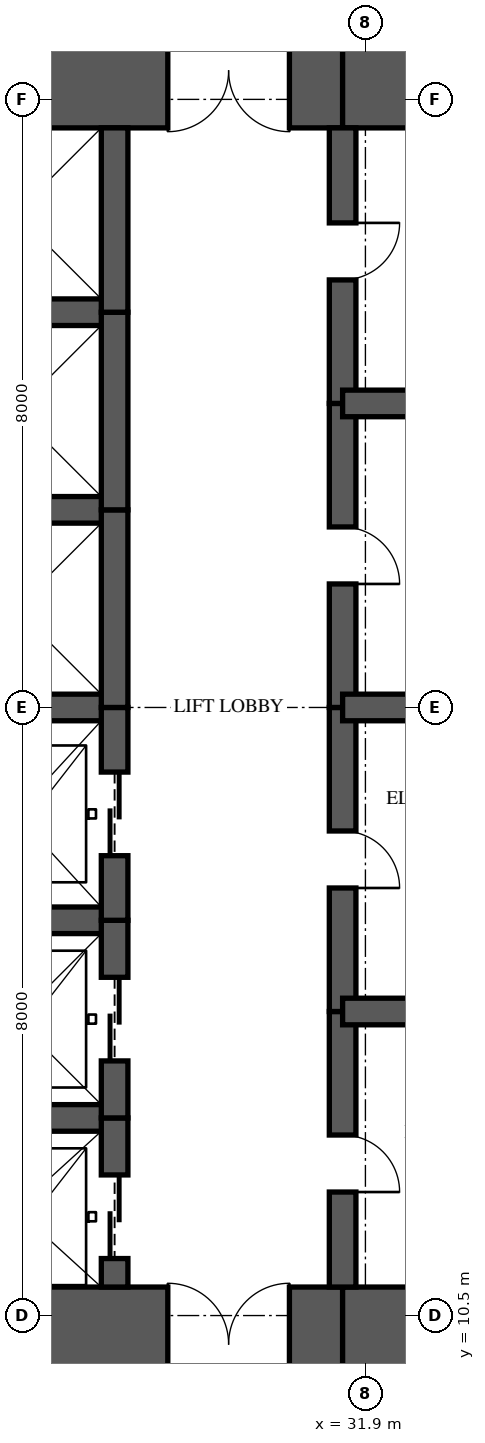
"""IFC4 building model, lengths in metres.
Left out: names, types, materials, properties, quantities, classifications, styles, units other than length and angle.
Written with IfcOpenShell. Run it as: python <this file> out.ifc"""

import sys

from ifc_helpers import new_model, si_unit, direction, frame, frame_2d, origin, place, context, subcontext, project, spatial, rectangle, extrude, element, fill, save


model = new_model("IFC4")
c1 = context("Model", 3, precision=1e-05, world=origin(), true_north=direction((0.0, 1.0)))
c2 = subcontext(c1, "Body", "Model", "MODEL_VIEW")
j1 = project(units=[si_unit("LENGTHUNIT", "METRE"), si_unit("PLANEANGLEUNIT", "RADIAN")], contexts=[c1])
p1 = place(None, origin())
s1 = spatial("IfcSite", under=j1, at=p1, CompositionType="ELEMENT")
p2 = place(p1, origin())
s2 = spatial("IfcBuilding", under=s1, at=p2, CompositionType="ELEMENT")
p3 = place(p2, frame((0.0, 0.0, 88.1)))
s3 = spatial("IfcBuildingStorey", under=s2, at=p3, CompositionType="ELEMENT", Elevation=88.1)
p4 = place(p3, frame((26.0, 10.125, 0.0), z_axis=(0.0, 0.0, 1.0), x_axis=(1.0, 0.0, 0.0)))
e1 = element("IfcWall", 1, at=p4, inside=s3, PredefinedType="SHEAR", context=c2, shape_type="SweptSolid", body=[
    extrude(rectangle(XDim=5.6, YDim=1.5, at=frame_2d((2.8, 0.0))), origin(), (0.0, 0.0, 1.0), 3.35),
])
p5 = place(p4, frame((3.3, 0.0, 0.0)))
e2 = element("IfcOpeningElement", 2, at=p5, cuts=e1, PredefinedType="OPENING", context=c2, shape_type="SweptSolid", body=[
    extrude(rectangle(XDim=1.6, YDim=2.1, at=frame_2d((0.8, 1.05))), frame((0.0, 0.76, 0.0), z_axis=(0.0, -1.0, 0.0), x_axis=(1.0, 0.0, 0.0)), (0.0, 0.0, 1.0), 1.52),
])
for number, where, z_axis, x_axis in (
    (3, (31.6, 10.125, 0.0), (0.0, 0.0, 1.0), (1.0, 0.0, 0.0)),
    (4, (35.9, 26.875, 0.0), (0.0, 0.0, 1.0), (-1.0, 0.0, 0.0)),
):
    element("IfcWall", number, at=place(p3, frame(where, z_axis=z_axis, x_axis=x_axis)), inside=s3, PredefinedType="SHEAR", context=c2, shape_type="SweptSolid", body=[
        extrude(rectangle(XDim=4.3, YDim=1.5, at=frame_2d((2.15, 0.0))), origin(), (0.0, 0.0, 1.0), 3.35),
    ])
p6 = place(p3, frame((31.6, 26.875, 0.0), z_axis=(0.0, 0.0, 1.0), x_axis=(-1.0, 0.0, 0.0)))
e5 = element("IfcWall", 5, at=p6, inside=s3, PredefinedType="SHEAR", context=c2, shape_type="SweptSolid", body=[
    extrude(rectangle(XDim=5.6, YDim=1.5, at=frame_2d((2.8, 0.0))), origin(), (0.0, 0.0, 1.0), 3.35),
])
p7 = place(p6, frame((0.7, 0.0, 0.0)))
e6 = element("IfcOpeningElement", 6, at=p7, cuts=e5, PredefinedType="OPENING", context=c2, shape_type="SweptSolid", body=[
    extrude(rectangle(XDim=1.6, YDim=2.1, at=frame_2d((0.8, 1.05))), frame((0.0, 0.76, 0.0), z_axis=(0.0, -1.0, 0.0), x_axis=(1.0, 0.0, 0.0)), (0.0, 0.0, 1.0), 1.52),
])
p8 = place(p3, frame((28.6, 10.875, 0.0), z_axis=(0.0, 0.0, 1.0), x_axis=(0.0, 1.0, 0.0)))
e7 = element("IfcWall", 7, at=p8, inside=s3, PredefinedType="SHEAR", context=c2, shape_type="SweptSolid", body=[
    extrude(rectangle(XDim=2.225, YDim=0.35, at=frame_2d((1.113, 0.0))), origin(), (0.0, 0.0, 1.0), 3.35),
])
p9 = place(p8, frame((0.375, 0.0, 0.0)))
e8 = element("IfcOpeningElement", 8, at=p9, cuts=e7, PredefinedType="OPENING", context=c2, shape_type="SweptSolid", body=[
    extrude(rectangle(XDim=1.1, YDim=2.1, at=frame_2d((0.55, 1.05))), frame((0.0, 0.185, 0.0), z_axis=(0.0, -1.0, 0.0), x_axis=(1.0, 0.0, 0.0)), (0.0, 0.0, 1.0), 0.37),
])
p10 = place(p3, frame((28.6, 13.1, 0.0), z_axis=(0.0, 0.0, 1.0), x_axis=(0.0, 1.0, 0.0)))
e9 = element("IfcWall", 9, at=p10, inside=s3, PredefinedType="SHEAR", context=c2, shape_type="SweptSolid", body=[
    extrude(rectangle(XDim=2.6, YDim=0.35, at=frame_2d((1.3, 0.0))), origin(), (0.0, 0.0, 1.0), 3.35),
])
p11 = place(p10, frame((0.75, 0.0, 0.0)))
e10 = element("IfcOpeningElement", 10, at=p11, cuts=e9, PredefinedType="OPENING", context=c2, shape_type="SweptSolid", body=[
    extrude(rectangle(XDim=1.1, YDim=2.1, at=frame_2d((0.55, 1.05))), frame((0.0, 0.185, 0.0), z_axis=(0.0, -1.0, 0.0), x_axis=(1.0, 0.0, 0.0)), (0.0, 0.0, 1.0), 0.37),
])
p12 = place(p3, frame((28.6, 15.7, 0.0), z_axis=(0.0, 0.0, 1.0), x_axis=(0.0, 1.0, 0.0)))
e11 = element("IfcWall", 11, at=p12, inside=s3, PredefinedType="SHEAR", context=c2, shape_type="SweptSolid", body=[
    extrude(rectangle(XDim=2.8, YDim=0.35, at=frame_2d((1.4, 0.0))), origin(), (0.0, 0.0, 1.0), 3.35),
])
p13 = place(p12, frame((0.85, 0.0, 0.0)))
e12 = element("IfcOpeningElement", 12, at=p13, cuts=e11, PredefinedType="OPENING", context=c2, shape_type="SweptSolid", body=[
    extrude(rectangle(XDim=1.1, YDim=2.1, at=frame_2d((0.55, 1.05))), frame((0.0, 0.185, 0.0), z_axis=(0.0, -1.0, 0.0), x_axis=(1.0, 0.0, 0.0)), (0.0, 0.0, 1.0), 0.37),
])
p14 = place(p3, frame((28.6, 18.5, 0.0), z_axis=(0.0, 0.0, 1.0), x_axis=(0.0, 1.0, 0.0)))
e13 = element("IfcWall", 13, at=p14, inside=s3, PredefinedType="SHEAR", context=c2, shape_type="SweptSolid", body=[
    extrude(rectangle(XDim=2.6, YDim=0.35, at=frame_2d((1.3, 0.0))), origin(), (0.0, 0.0, 1.0), 3.35),
])
p15 = place(p3, frame((28.6, 21.1, 0.0), z_axis=(0.0, 0.0, 1.0), x_axis=(0.0, 1.0, 0.0)))
e14 = element("IfcWall", 14, at=p15, inside=s3, PredefinedType="SHEAR", context=c2, shape_type="SweptSolid", body=[
    extrude(rectangle(XDim=2.6, YDim=0.35, at=frame_2d((1.3, 0.0))), origin(), (0.0, 0.0, 1.0), 3.35),
])
p16 = place(p3, frame((28.6, 23.7, 0.0), z_axis=(0.0, 0.0, 1.0), x_axis=(0.0, 1.0, 0.0)))
e15 = element("IfcWall", 15, at=p16, inside=s3, PredefinedType="SHEAR", context=c2, shape_type="SweptSolid", body=[
    extrude(rectangle(XDim=2.425, YDim=0.35, at=frame_2d((1.212, 0.0))), origin(), (0.0, 0.0, 1.0), 3.35),
])
p17 = place(p3, frame((31.6, 10.875, 0.0), z_axis=(0.0, 0.0, 1.0), x_axis=(0.0, 1.0, 0.0)))
e16 = element("IfcWall", 16, at=p17, inside=s3, PredefinedType="SHEAR", context=c2, shape_type="SweptSolid", body=[
    extrude(rectangle(XDim=3.625, YDim=0.35, at=frame_2d((1.812, 0.0))), origin(), (0.0, 0.0, 1.0), 3.35),
])
p18 = place(p17, frame((1.25, 0.0, 0.0)))
e17 = element("IfcOpeningElement", 17, at=p18, cuts=e16, PredefinedType="OPENING", context=c2, shape_type="SweptSolid", body=[
    extrude(rectangle(XDim=0.75, YDim=2.1, at=frame_2d((0.375, 1.05))), frame((0.0, 0.185, 0.0), z_axis=(0.0, -1.0, 0.0), x_axis=(1.0, 0.0, 0.0)), (0.0, 0.0, 1.0), 0.37),
])
p19 = place(p3, frame((31.6, 14.5, 0.0), z_axis=(0.0, 0.0, 1.0), x_axis=(0.0, 1.0, 0.0)))
e18 = element("IfcWall", 18, at=p19, inside=s3, PredefinedType="SHEAR", context=c2, shape_type="SweptSolid", body=[
    extrude(rectangle(XDim=4.0, YDim=0.35, at=frame_2d((2.0, 0.0))), origin(), (0.0, 0.0, 1.0), 3.35),
])
p20 = place(p19, frame((1.625, 0.0, 0.0)))
e19 = element("IfcOpeningElement", 19, at=p20, cuts=e18, PredefinedType="OPENING", context=c2, shape_type="SweptSolid", body=[
    extrude(rectangle(XDim=0.75, YDim=2.1, at=frame_2d((0.375, 1.05))), frame((0.0, 0.185, 0.0), z_axis=(0.0, -1.0, 0.0), x_axis=(1.0, 0.0, 0.0)), (0.0, 0.0, 1.0), 0.37),
])
p21 = place(p3, frame((31.6, 18.5, 0.0), z_axis=(0.0, 0.0, 1.0), x_axis=(0.0, 1.0, 0.0)))
e20 = element("IfcWall", 20, at=p21, inside=s3, PredefinedType="SHEAR", context=c2, shape_type="SweptSolid", body=[
    extrude(rectangle(XDim=4.0, YDim=0.35, at=frame_2d((2.0, 0.0))), origin(), (0.0, 0.0, 1.0), 3.35),
])
p22 = place(p21, frame((1.625, 0.0, 0.0)))
e21 = element("IfcOpeningElement", 21, at=p22, cuts=e20, PredefinedType="OPENING", context=c2, shape_type="SweptSolid", body=[
    extrude(rectangle(XDim=0.75, YDim=2.1, at=frame_2d((0.375, 1.05))), frame((0.0, 0.185, 0.0), z_axis=(0.0, -1.0, 0.0), x_axis=(1.0, 0.0, 0.0)), (0.0, 0.0, 1.0), 0.37),
])
p23 = place(p3, frame((31.6, 22.5, 0.0), z_axis=(0.0, 0.0, 1.0), x_axis=(0.0, 1.0, 0.0)))
e22 = element("IfcWall", 22, at=p23, inside=s3, PredefinedType="SHEAR", context=c2, shape_type="SweptSolid", body=[
    extrude(rectangle(XDim=3.625, YDim=0.35, at=frame_2d((1.812, 0.0))), origin(), (0.0, 0.0, 1.0), 3.35),
])
p24 = place(p23, frame((1.625, 0.0, 0.0)))
e23 = element("IfcOpeningElement", 23, at=p24, cuts=e22, PredefinedType="OPENING", context=c2, shape_type="SweptSolid", body=[
    extrude(rectangle(XDim=0.75, YDim=2.1, at=frame_2d((0.375, 1.05))), frame((0.0, 0.185, 0.0), z_axis=(0.0, -1.0, 0.0), x_axis=(1.0, 0.0, 0.0)), (0.0, 0.0, 1.0), 0.37),
])
for number, where, z_axis, x_axis in (
    (24, (26.0, 13.1, 0.0), (0.0, 0.0, 1.0), (1.0, 0.0, 0.0)),
    (25, (26.0, 15.7, 0.0), (0.0, 0.0, 1.0), (1.0, 0.0, 0.0)),
    (26, (26.0, 18.5, 0.0), (0.0, 0.0, 1.0), (1.0, 0.0, 0.0)),
    (27, (26.0, 21.1, 0.0), (0.0, 0.0, 1.0), (1.0, 0.0, 0.0)),
    (28, (26.0, 23.7, 0.0), (0.0, 0.0, 1.0), (1.0, 0.0, 0.0)),
):
    element("IfcWall", number, at=place(p3, frame(where, z_axis=z_axis, x_axis=x_axis)), inside=s3, PredefinedType="SHEAR", context=c2, shape_type="SweptSolid", body=[
        extrude(rectangle(XDim=2.6, YDim=0.35, at=frame_2d((1.3, 0.0))), origin(), (0.0, 0.0, 1.0), 3.35),
    ])
for number, where, z_axis, x_axis in (
    (29, (31.6, 14.5, 0.0), (0.0, 0.0, 1.0), (1.0, 0.0, 0.0)),
    (30, (31.6, 18.5, 0.0), (0.0, 0.0, 1.0), (1.0, 0.0, 0.0)),
    (31, (31.6, 22.5, 0.0), (0.0, 0.0, 1.0), (1.0, 0.0, 0.0)),
):
    element("IfcWall", number, at=place(p3, frame(where, z_axis=z_axis, x_axis=x_axis)), inside=s3, PredefinedType="SHEAR", context=c2, shape_type="SweptSolid", body=[
        extrude(rectangle(XDim=4.3, YDim=0.35, at=frame_2d((2.15, 0.0))), origin(), (0.0, 0.0, 1.0), 3.35),
    ])
p25 = place(p9, origin())
e32 = element("IfcDoor", 32, at=p25, inside=s3, OperationType="SLIDING_TO_LEFT", PredefinedType="DOOR", context=c2, shape_type="SweptSolid", body=[
    extrude(rectangle(XDim=1.1, YDim=2.1, at=frame_2d((0.55, 1.05))), frame((0.0, 0.025, 0.0), z_axis=(0.0, -1.0, 0.0), x_axis=(1.0, 0.0, 0.0)), (0.0, 0.0, 1.0), 0.05),
])
fill(e8, e32)
p26 = place(p11, origin())
e33 = element("IfcDoor", 33, at=p26, inside=s3, OperationType="SLIDING_TO_LEFT", PredefinedType="DOOR", context=c2, shape_type="SweptSolid", body=[
    extrude(rectangle(XDim=1.1, YDim=2.1, at=frame_2d((0.55, 1.05))), frame((0.0, 0.025, 0.0), z_axis=(0.0, -1.0, 0.0), x_axis=(1.0, 0.0, 0.0)), (0.0, 0.0, 1.0), 0.05),
])
fill(e10, e33)
p27 = place(p13, origin())
e34 = element("IfcDoor", 34, at=p27, inside=s3, OperationType="SLIDING_TO_LEFT", PredefinedType="DOOR", context=c2, shape_type="SweptSolid", body=[
    extrude(rectangle(XDim=1.1, YDim=2.1, at=frame_2d((0.55, 1.05))), frame((0.0, 0.025, 0.0), z_axis=(0.0, -1.0, 0.0), x_axis=(1.0, 0.0, 0.0)), (0.0, 0.0, 1.0), 0.05),
])
fill(e12, e34)
p28 = place(p5, origin())
e35 = element("IfcDoor", 35, at=p28, inside=s3, OperationType="DOUBLE_DOOR_SINGLE_SWING", PredefinedType="DOOR", context=c2, shape_type="SweptSolid", body=[
    extrude(rectangle(XDim=1.6, YDim=2.1, at=frame_2d((0.8, 1.05))), frame((0.0, 0.025, 0.0), z_axis=(0.0, -1.0, 0.0), x_axis=(1.0, 0.0, 0.0)), (0.0, 0.0, 1.0), 0.05),
])
fill(e2, e35)
p29 = place(p7, origin())
e36 = element("IfcDoor", 36, at=p29, inside=s3, OperationType="DOUBLE_DOOR_SINGLE_SWING", PredefinedType="DOOR", context=c2, shape_type="SweptSolid", body=[
    extrude(rectangle(XDim=1.6, YDim=2.1, at=frame_2d((0.8, 1.05))), frame((0.0, 0.025, 0.0), z_axis=(0.0, -1.0, 0.0), x_axis=(1.0, 0.0, 0.0)), (0.0, 0.0, 1.0), 0.05),
])
fill(e6, e36)
p30 = place(p18, frame((0.75, 0.0, 0.0), z_axis=(0.0, 0.0, 1.0), x_axis=(-1.0, 0.0, 0.0)))
e37 = element("IfcDoor", 37, at=p30, inside=s3, OperationType="SINGLE_SWING_RIGHT", PredefinedType="DOOR", context=c2, shape_type="SweptSolid", body=[
    extrude(rectangle(XDim=0.75, YDim=2.1, at=frame_2d((0.375, 1.05))), frame((0.0, 0.025, 0.0), z_axis=(0.0, -1.0, 0.0), x_axis=(1.0, 0.0, 0.0)), (0.0, 0.0, 1.0), 0.05),
])
fill(e17, e37)
p31 = place(p20, frame((0.75, 0.0, 0.0), z_axis=(0.0, 0.0, 1.0), x_axis=(-1.0, 0.0, 0.0)))
e38 = element("IfcDoor", 38, at=p31, inside=s3, OperationType="SINGLE_SWING_RIGHT", PredefinedType="DOOR", context=c2, shape_type="SweptSolid", body=[
    extrude(rectangle(XDim=0.75, YDim=2.1, at=frame_2d((0.375, 1.05))), frame((0.0, 0.025, 0.0), z_axis=(0.0, -1.0, 0.0), x_axis=(1.0, 0.0, 0.0)), (0.0, 0.0, 1.0), 0.05),
])
fill(e19, e38)
p32 = place(p22, frame((0.75, 0.0, 0.0), z_axis=(0.0, 0.0, 1.0), x_axis=(-1.0, 0.0, 0.0)))
e39 = element("IfcDoor", 39, at=p32, inside=s3, OperationType="SINGLE_SWING_RIGHT", PredefinedType="DOOR", context=c2, shape_type="SweptSolid", body=[
    extrude(rectangle(XDim=0.75, YDim=2.1, at=frame_2d((0.375, 1.05))), frame((0.0, 0.025, 0.0), z_axis=(0.0, -1.0, 0.0), x_axis=(1.0, 0.0, 0.0)), (0.0, 0.0, 1.0), 0.05),
])
fill(e21, e39)
p33 = place(p24, frame((0.75, 0.0, 0.0), z_axis=(0.0, 0.0, 1.0), x_axis=(-1.0, 0.0, 0.0)))
e40 = element("IfcDoor", 40, at=p33, inside=s3, OperationType="SINGLE_SWING_LEFT", PredefinedType="DOOR", context=c2, shape_type="SweptSolid", body=[
    extrude(rectangle(XDim=0.75, YDim=2.1, at=frame_2d((0.375, 1.05))), frame((0.0, 0.025, 0.0), z_axis=(0.0, -1.0, 0.0), x_axis=(1.0, 0.0, 0.0)), (0.0, 0.0, 1.0), 0.05),
])
fill(e23, e40)
save(model, sys.argv[1])
